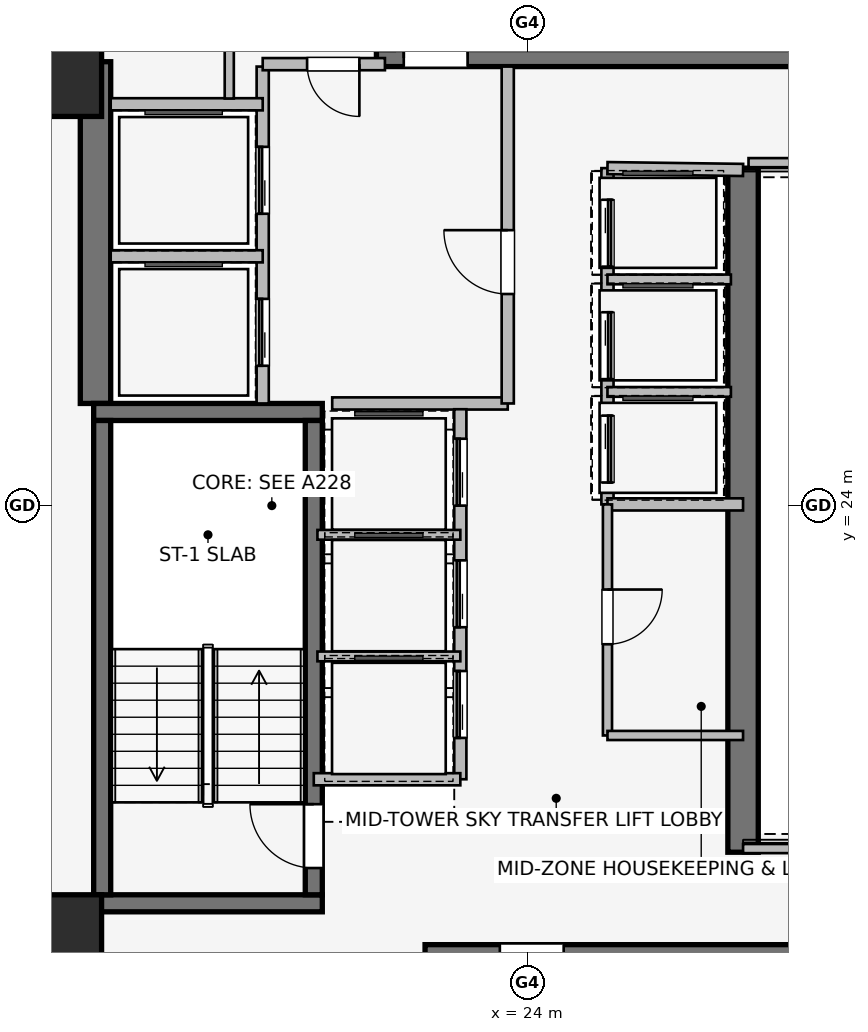
"""IFC4 building model, lengths in metres.
Left out: names, types, materials, properties, quantities, classifications, styles, units other than length and angle.
Written with IfcOpenShell. Run it as: python <this file> out.ifc"""

import sys

from ifc_helpers import new_model, si_unit, direction, frame, frame_2d, origin, origin_2d, place, context, subcontext, project, spatial, rectangle, extrude, element, fill, save


model = new_model("IFC4")
c1 = context("Model", 3, precision=1e-05, world=origin(), true_north=direction((0.0, 1.0)))
c2 = subcontext(c1, "Body", "Model", "MODEL_VIEW")
j1 = project(units=[si_unit("LENGTHUNIT", "METRE"), si_unit("PLANEANGLEUNIT", "RADIAN")], contexts=[c1])
p1 = place(None, origin())
s1 = spatial("IfcSite", under=j1, at=p1, CompositionType="ELEMENT")
p2 = place(p1, origin())
s2 = spatial("IfcBuilding", under=s1, at=p2, CompositionType="ELEMENT")
p3 = place(p2, frame((0.0, 0.0, 101.55)))
s3 = spatial("IfcBuildingStorey", under=s2, at=p3, CompositionType="ELEMENT", Elevation=101.55)
p4 = place(p3, frame((16.9, 25.68, 0.0), z_axis=(0.0, 0.0, 1.0), x_axis=(0.0, 1.0, 0.0)))
e1 = element("IfcWall", 1, at=p4, inside=s3, PredefinedType="SHEAR", context=c2, shape_type="SweptSolid", body=[
    extrude(rectangle(XDim=5.62, YDim=0.5, at=frame_2d((2.81, 0.0))), origin(), (0.0, 0.0, 1.0), 3.45),
])
p5 = place(p3, frame((27.55, 29.55, 0.0), z_axis=(0.0, 0.0, 1.0), x_axis=(0.0, -1.0, 0.0)))
e2 = element("IfcWall", 2, at=p5, inside=s3, PredefinedType="SHEAR", context=c2, shape_type="SweptSolid", body=[
    extrude(rectangle(XDim=11.25, YDim=0.5, at=frame_2d((5.625, 0.0))), origin(), (0.0, 0.0, 1.0), 3.45),
])
for number, where, z_axis, x_axis in (
    (3, (16.87, 17.46, 0.0), (0.0, 0.0, 1.0), (1.0, 0.0, 0.0)),
    (4, (20.63, 25.54, 0.0), (0.0, 0.0, 1.0), (-1.0, 0.0, 0.0)),
):
    element("IfcWall", number, at=place(p3, frame(where, z_axis=z_axis, x_axis=x_axis)), inside=s3, PredefinedType="SHEAR", context=c2, shape_type="SweptSolid", body=[
        extrude(rectangle(XDim=3.76, YDim=0.28, at=frame_2d((1.88, 0.0))), origin(), (0.0, 0.0, 1.0), 3.45),
    ])
p6 = place(p3, frame((17.01, 25.4, 0.0), z_axis=(0.0, 0.0, 1.0), x_axis=(0.0, -1.0, 0.0)))
e5 = element("IfcWall", 5, at=p6, inside=s3, PredefinedType="SHEAR", context=c2, shape_type="SweptSolid", body=[
    extrude(rectangle(XDim=7.8, YDim=0.28, at=frame_2d((3.9, 0.0))), origin(), (0.0, 0.0, 1.0), 3.45),
])
p7 = place(p3, frame((20.49, 17.6, 0.0), z_axis=(0.0, 0.0, 1.0), x_axis=(0.0, 1.0, 0.0)))
e6 = element("IfcWall", 6, at=p7, inside=s3, PredefinedType="SHEAR", context=c2, shape_type="SweptSolid", body=[
    extrude(rectangle(XDim=7.8, YDim=0.28, at=frame_2d((3.9, 0.0))), origin(), (0.0, 0.0, 1.0), 3.45),
])
p8 = place(p7, frame((0.44, 0.0, 0.0)))
e7 = element("IfcOpeningElement", 7, at=p8, cuts=e6, PredefinedType="OPENING", context=c2, shape_type="SweptSolid", body=[
    extrude(rectangle(XDim=1.05, YDim=2.0, at=frame_2d((0.525, 1.0))), frame((0.0, 0.15, 0.0), z_axis=(0.0, -1.0, 0.0), x_axis=(1.0, 0.0, 0.0)), (0.0, 0.0, 1.0), 0.3),
])
p9 = place(p3, frame((30.68, 16.64, 0.0), z_axis=(0.0, 0.0, 1.0), x_axis=(-1.0, 0.0, 0.0)))
e8 = element("IfcWall", 8, at=p9, inside=s3, PredefinedType="SHEAR", context=c2, shape_type="SweptSolid", body=[
    extrude(rectangle(XDim=8.36, YDim=0.28, at=frame_2d((4.18, 0.0))), origin(), (0.0, 0.0, 1.0), 3.45),
])
p10 = place(p9, frame((6.08, 0.0, 0.0)))
e9 = element("IfcOpeningElement", 9, at=p10, cuts=e8, PredefinedType="OPENING", context=c2, shape_type="SweptSolid", body=[
    extrude(rectangle(XDim=1.05, YDim=2.0, at=frame_2d((0.525, 1.0))), frame((0.0, 0.15, 0.0), z_axis=(0.0, -1.0, 0.0), x_axis=(1.0, 0.0, 0.0)), (0.0, 0.0, 1.0), 0.3),
])
p11 = place(p3, frame((21.52, 31.36, 0.0), z_axis=(0.0, 0.0, 1.0), x_axis=(1.0, 0.0, 0.0)))
e10 = element("IfcWall", 10, at=p11, inside=s3, PredefinedType="SHEAR", context=c2, shape_type="SweptSolid", body=[
    extrude(rectangle(XDim=8.36, YDim=0.28, at=frame_2d((4.18, 0.0))), origin(), (0.0, 0.0, 1.0), 3.45),
])
p12 = place(p11, frame((0.45, 0.0, 0.0)))
e11 = element("IfcOpeningElement", 11, at=p12, cuts=e10, PredefinedType="OPENING", context=c2, shape_type="SweptSolid", body=[
    extrude(rectangle(XDim=1.05, YDim=2.0, at=frame_2d((0.525, 1.0))), frame((0.0, 0.15, 0.0), z_axis=(0.0, -1.0, 0.0), x_axis=(1.0, 0.0, 0.0)), (0.0, 0.0, 1.0), 0.3),
])
for number, where, z_axis, x_axis in (
    (12, (16.3, 16.9, 0.0), (0.0, 0.0, 1.0), (1.0, 0.0, 0.0)),
    (13, (16.3, 31.1, 0.0), (0.0, 0.0, 1.0), (1.0, 0.0, 0.0)),
):
    element("IfcColumn", number, at=place(p3, frame(where, z_axis=z_axis, x_axis=x_axis)), inside=s3, PredefinedType="COLUMN", context=c2, shape_type="SweptSolid", body=[
        extrude(rectangle(XDim=1.4, YDim=1.4, at=origin_2d()), origin(), (0.0, 0.0, 1.0), 3.45),
    ])
p13 = place(p3, frame((19.65, 25.68, 0.0), z_axis=(0.0, 0.0, 1.0), x_axis=(0.0, 1.0, 0.0)))
e14 = element("IfcWall", 14, at=p13, inside=s3, PredefinedType="PARTITIONING", context=c2, shape_type="SweptSolid", body=[
    extrude(rectangle(XDim=5.54, YDim=0.2, at=frame_2d((2.77, 0.0))), origin(), (0.0, 0.0, 1.0), 3.19),
])
p14 = place(p13, frame((0.62, 0.0, 0.0)))
e15 = element("IfcOpeningElement", 15, at=p14, cuts=e14, PredefinedType="OPENING", context=c2, shape_type="SweptSolid", body=[
    extrude(rectangle(XDim=1.1, YDim=2.2, at=frame_2d((0.55, 1.1))), frame((0.0, 0.11, 0.0), z_axis=(0.0, -1.0, 0.0), x_axis=(1.0, 0.0, 0.0)), (0.0, 0.0, 1.0), 0.22),
])
p15 = place(p13, frame((3.12, 0.0, 0.0)))
e16 = element("IfcOpeningElement", 16, at=p15, cuts=e14, PredefinedType="OPENING", context=c2, shape_type="SweptSolid", body=[
    extrude(rectangle(XDim=1.1, YDim=2.2, at=frame_2d((0.55, 1.1))), frame((0.0, 0.11, 0.0), z_axis=(0.0, -1.0, 0.0), x_axis=(1.0, 0.0, 0.0)), (0.0, 0.0, 1.0), 0.22),
])
p16 = place(p3, frame((20.793, 25.68, 0.0), z_axis=(0.0, 0.0, 1.0), x_axis=(1.0, 0.0, 0.0)))
e17 = element("IfcWall", 17, at=p16, inside=s3, PredefinedType="PARTITIONING", context=c2, shape_type="SweptSolid", body=[
    extrude(rectangle(XDim=2.887, YDim=0.2, at=frame_2d((1.443, 0.0))), origin(), (0.0, 0.0, 1.0), 3.19),
])
p17 = place(p3, frame((23.68, 25.68, 0.0), z_axis=(0.0, 0.0, 1.0), x_axis=(0.0, 1.0, 0.0)))
e18 = element("IfcWall", 18, at=p17, inside=s3, PredefinedType="PARTITIONING", context=c2, shape_type="SweptSolid", body=[
    extrude(rectangle(XDim=5.54, YDim=0.2, at=frame_2d((2.77, 0.0))), origin(), (0.0, 0.0, 1.0), 3.19),
])
p18 = place(p17, frame((1.8, 0.0, 0.0)))
e19 = element("IfcOpeningElement", 19, at=p18, cuts=e18, PredefinedType="OPENING", context=c2, shape_type="SweptSolid", body=[
    extrude(rectangle(XDim=1.05, YDim=2.0, at=frame_2d((0.525, 1.0))), frame((0.0, 0.11, 0.0), z_axis=(0.0, -1.0, 0.0), x_axis=(1.0, 0.0, 0.0)), (0.0, 0.0, 1.0), 0.22),
])
p19 = place(p3, frame((21.66, 31.26, 0.0), z_axis=(0.0, 0.0, 1.0), x_axis=(-1.0, 0.0, 0.0)))
e20 = element("IfcWall", 20, at=p19, inside=s3, PredefinedType="PARTITIONING", context=c2, shape_type="SweptSolid", body=[
    extrude(rectangle(XDim=2.01, YDim=0.2, at=frame_2d((1.005, 0.0))), origin(), (0.0, 0.0, 1.0), 3.19),
])
p20 = place(p19, frame((0.42, 0.0, 0.0)))
e21 = element("IfcOpeningElement", 21, at=p20, cuts=e20, PredefinedType="OPENING", context=c2, shape_type="SweptSolid", body=[
    extrude(rectangle(XDim=0.86, YDim=2.0, at=frame_2d((0.43, 1.0))), frame((0.0, 0.11, 0.0), z_axis=(0.0, -1.0, 0.0), x_axis=(1.0, 0.0, 0.0)), (0.0, 0.0, 1.0), 0.22),
])
p21 = place(p3, frame((17.15, 28.1, 0.0), z_axis=(0.0, 0.0, 1.0), x_axis=(1.0, 0.0, 0.0)))
e22 = element("IfcWall", 22, at=p21, inside=s3, PredefinedType="PARTITIONING", context=c2, shape_type="SweptSolid", body=[
    extrude(rectangle(XDim=2.5, YDim=0.2, at=frame_2d((1.25, 0.0))), origin(), (0.0, 0.0, 1.0), 3.19),
])
p22 = place(p3, frame((19.65, 30.6, 0.0), z_axis=(0.0, 0.0, 1.0), x_axis=(-1.0, 0.0, 0.0)))
e23 = element("IfcWall", 23, at=p22, inside=s3, PredefinedType="PARTITIONING", context=c2, shape_type="SweptSolid", body=[
    extrude(rectangle(XDim=2.5, YDim=0.2, at=frame_2d((1.25, 0.0))), origin(), (0.0, 0.0, 1.0), 2.09),
])
p23 = place(p3, frame((22.9, 19.5, 0.0), z_axis=(0.0, 0.0, 1.0), x_axis=(0.0, 1.0, 0.0)))
e24 = element("IfcWall", 24, at=p23, inside=s3, PredefinedType="PARTITIONING", context=c2, shape_type="SweptSolid", body=[
    extrude(rectangle(XDim=6.085, YDim=0.2, at=frame_2d((3.042, 0.0))), origin(), (0.0, 0.0, 1.0), 3.19),
])
p24 = place(p23, frame((0.68, 0.0, 0.0)))
e25 = element("IfcOpeningElement", 25, at=p24, cuts=e24, PredefinedType="OPENING", context=c2, shape_type="SweptSolid", body=[
    extrude(rectangle(XDim=1.1, YDim=2.2, at=frame_2d((0.55, 1.1))), frame((0.0, 0.11, 0.0), z_axis=(0.0, -1.0, 0.0), x_axis=(1.0, 0.0, 0.0)), (0.0, 0.0, 1.0), 0.22),
])
p25 = place(p23, frame((2.5, 0.0, 0.0)))
e26 = element("IfcOpeningElement", 26, at=p25, cuts=e24, PredefinedType="OPENING", context=c2, shape_type="SweptSolid", body=[
    extrude(rectangle(XDim=1.1, YDim=2.2, at=frame_2d((0.55, 1.1))), frame((0.0, 0.11, 0.0), z_axis=(0.0, -1.0, 0.0), x_axis=(1.0, 0.0, 0.0)), (0.0, 0.0, 1.0), 0.22),
])
p26 = place(p23, frame((4.5, 0.0, 0.0)))
e27 = element("IfcOpeningElement", 27, at=p26, cuts=e24, PredefinedType="OPENING", context=c2, shape_type="SweptSolid", body=[
    extrude(rectangle(XDim=1.1, YDim=2.2, at=frame_2d((0.55, 1.1))), frame((0.0, 0.11, 0.0), z_axis=(0.0, -1.0, 0.0), x_axis=(1.0, 0.0, 0.0)), (0.0, 0.0, 1.0), 0.22),
])
p27 = place(p3, frame((20.49, 19.5, 0.0), z_axis=(0.0, 0.0, 1.0), x_axis=(1.0, 0.0, 0.0)))
e28 = element("IfcWall", 28, at=p27, inside=s3, PredefinedType="PARTITIONING", context=c2, shape_type="SweptSolid", body=[
    extrude(rectangle(XDim=2.41, YDim=0.2, at=frame_2d((1.205, 0.0))), origin(), (0.0, 0.0, 1.0), 2.09),
])
for number, where, z_axis, x_axis in (
    (29, (20.55, 21.52, 0.0), (0.0, 0.0, 1.0), (1.0, 0.0, 0.0)),
    (30, (20.55, 23.52, 0.0), (0.0, 0.0, 1.0), (1.0, 0.0, 0.0)),
):
    element("IfcWall", number, at=place(p3, frame(where, z_axis=z_axis, x_axis=x_axis)), inside=s3, PredefinedType="PARTITIONING", context=c2, shape_type="SweptSolid", body=[
        extrude(rectangle(XDim=2.35, YDim=0.16, at=frame_2d((1.175, 0.0))), origin(), (0.0, 0.0, 1.0), 3.19),
    ])
p28 = place(p3, frame((25.32, 29.55, 0.0), z_axis=(0.0, 0.0, 1.0), x_axis=(0.0, -1.0, 0.0)))
e31 = element("IfcWall", 31, at=p28, inside=s3, PredefinedType="PARTITIONING", context=c2, shape_type="SweptSolid", body=[
    extrude(rectangle(XDim=5.53, YDim=0.2, at=frame_2d((2.765, 0.0))), origin(), (0.0, 0.0, 1.0), 3.19),
])
p29 = place(p28, frame((0.52, 0.0, 0.0)))
e32 = element("IfcOpeningElement", 32, at=p29, cuts=e31, PredefinedType="OPENING", context=c2, shape_type="SweptSolid", body=[
    extrude(rectangle(XDim=1.1, YDim=2.2, at=frame_2d((0.55, 1.1))), frame((0.0, 0.11, 0.0), z_axis=(0.0, -1.0, 0.0), x_axis=(1.0, 0.0, 0.0)), (0.0, 0.0, 1.0), 0.22),
])
p30 = place(p28, frame((2.37, 0.0, 0.0)))
e33 = element("IfcOpeningElement", 33, at=p30, cuts=e31, PredefinedType="OPENING", context=c2, shape_type="SweptSolid", body=[
    extrude(rectangle(XDim=1.1, YDim=2.2, at=frame_2d((0.55, 1.1))), frame((0.0, 0.11, 0.0), z_axis=(0.0, -1.0, 0.0), x_axis=(1.0, 0.0, 0.0)), (0.0, 0.0, 1.0), 0.22),
])
p31 = place(p28, frame((4.07, 0.0, 0.0)))
e34 = element("IfcOpeningElement", 34, at=p31, cuts=e31, PredefinedType="OPENING", context=c2, shape_type="SweptSolid", body=[
    extrude(rectangle(XDim=1.1, YDim=2.2, at=frame_2d((0.55, 1.1))), frame((0.0, 0.11, 0.0), z_axis=(0.0, -1.0, 0.0), x_axis=(1.0, 0.0, 0.0)), (0.0, 0.0, 1.0), 0.22),
])
p32 = place(p3, frame((27.55, 29.52, 0.0), z_axis=(0.0, 0.0, 1.0), x_axis=(-0.999909343457, 0.013464949556, 0.0)))
e35 = element("IfcWall", 35, at=p32, inside=s3, PredefinedType="PARTITIONING", context=c2, shape_type="SweptSolid", body=[
    extrude(rectangle(XDim=2.23, YDim=0.2, at=frame_2d((1.115, 0.0))), origin(), (0.0, 0.0, 1.0), 2.09),
])
p33 = place(p3, frame((25.32, 24.02, 0.0), z_axis=(0.0, 0.0, 1.0), x_axis=(1.0, 0.0, 0.0)))
e36 = element("IfcWall", 36, at=p33, inside=s3, PredefinedType="PARTITIONING", context=c2, shape_type="SweptSolid", body=[
    extrude(rectangle(XDim=2.23, YDim=0.2, at=frame_2d((1.115, 0.0))), origin(), (0.0, 0.0, 1.0), 3.19),
])
for number, where, z_axis, x_axis in (
    (37, (25.32, 25.87, 0.0), (0.0, 0.0, 1.0), (1.0, 0.0, 0.0)),
    (38, (25.32, 27.72, 0.0), (0.0, 0.0, 1.0), (1.0, 0.0, 0.0)),
):
    element("IfcWall", number, at=place(p3, frame(where, z_axis=z_axis, x_axis=x_axis)), inside=s3, PredefinedType="PARTITIONING", context=c2, shape_type="SweptSolid", body=[
        extrude(rectangle(XDim=2.03, YDim=0.16, at=frame_2d((1.015, 0.0))), origin(), (0.0, 0.0, 1.0), 3.19),
    ])
p34 = place(p3, frame((25.32, 24.02, 0.0), z_axis=(0.0, 0.0, 1.0), x_axis=(0.0, -1.0, 0.0)))
e39 = element("IfcWall", 39, at=p34, inside=s3, PredefinedType="PARTITIONING", context=c2, shape_type="SweptSolid", body=[
    extrude(rectangle(XDim=3.8, YDim=0.15, at=frame_2d((1.9, 0.0))), origin(), (0.0, 0.0, 1.0), 3.19),
])
p35 = place(p34, frame((1.4, 0.0, 0.0)))
e40 = element("IfcOpeningElement", 40, at=p35, cuts=e39, PredefinedType="OPENING", context=c2, shape_type="SweptSolid", body=[
    extrude(rectangle(XDim=0.9, YDim=2.0, at=frame_2d((0.45, 1.0))), frame((0.0, 0.085, 0.0), z_axis=(0.0, -1.0, 0.0), x_axis=(1.0, 0.0, 0.0)), (0.0, 0.0, 1.0), 0.17),
])
p36 = place(p3, frame((25.32, 20.22, 0.0), z_axis=(0.0, 0.0, 1.0), x_axis=(1.0, 0.0, 0.0)))
e41 = element("IfcWall", 41, at=p36, inside=s3, PredefinedType="PARTITIONING", context=c2, shape_type="SweptSolid", body=[
    extrude(rectangle(XDim=2.23, YDim=0.15, at=frame_2d((1.115, 0.0))), origin(), (0.0, 0.0, 1.0), 3.19),
])
p37 = place(p3, frame((19.1, 33.35, 0.0), z_axis=(0.0, 0.0, 1.0), x_axis=(0.0, -1.0, 0.0)))
e42 = element("IfcWall", 42, at=p37, inside=s3, PredefinedType="PARTITIONING", context=c2, shape_type="SweptSolid", body=[
    extrude(rectangle(XDim=2.655, YDim=0.15, at=frame_2d((1.328, 0.0))), origin(), (0.0, 0.0, 1.0), 2.42),
])
p38 = place(p3, frame((27.55, 18.36, 0.0), z_axis=(0.0, 0.0, 1.0), x_axis=(1.0, 0.0, 0.0)))
e43 = element("IfcWall", 43, at=p38, inside=s3, PredefinedType="PARTITIONING", context=c2, shape_type="SweptSolid", body=[
    extrude(rectangle(XDim=12.29, YDim=0.15, at=frame_2d((6.145, 0.0))), origin(), (0.0, 0.0, 1.0), 2.331),
])
p39 = place(p3, frame((39.84, 29.64, 0.0), z_axis=(0.0, 0.0, 1.0), x_axis=(-1.0, 0.0, 0.0)))
e44 = element("IfcWall", 44, at=p39, inside=s3, PredefinedType="PARTITIONING", context=c2, shape_type="SweptSolid", body=[
    extrude(rectangle(XDim=12.2, YDim=0.15, at=frame_2d((6.1, 0.0))), origin(), (0.0, 0.0, 1.0), 2.331),
])
p40 = place(p8, origin())
e45 = element("IfcDoor", 45, at=p40, inside=s3, OperationType="SINGLE_SWING_RIGHT", PredefinedType="DOOR", context=c2, shape_type="SweptSolid", body=[
    extrude(rectangle(XDim=1.05, YDim=2.0, at=frame_2d((0.525, 1.0))), frame((0.0, 0.025, 0.0), z_axis=(0.0, -1.0, 0.0), x_axis=(1.0, 0.0, 0.0)), (0.0, 0.0, 1.0), 0.05),
])
fill(e7, e45)
p41 = place(p10, origin())
e46 = element("IfcDoor", 46, at=p41, inside=s3, OperationType="SINGLE_SWING_RIGHT", PredefinedType="DOOR", context=c2, shape_type="SweptSolid", body=[
    extrude(rectangle(XDim=1.05, YDim=2.0, at=frame_2d((0.525, 1.0))), frame((0.0, 0.025, 0.0), z_axis=(0.0, -1.0, 0.0), x_axis=(1.0, 0.0, 0.0)), (0.0, 0.0, 1.0), 0.05),
])
fill(e9, e46)
p42 = place(p12, origin())
e47 = element("IfcDoor", 47, at=p42, inside=s3, OperationType="SINGLE_SWING_LEFT", PredefinedType="DOOR", context=c2, shape_type="SweptSolid", body=[
    extrude(rectangle(XDim=1.05, YDim=2.0, at=frame_2d((0.525, 1.0))), frame((0.0, 0.025, 0.0), z_axis=(0.0, -1.0, 0.0), x_axis=(1.0, 0.0, 0.0)), (0.0, 0.0, 1.0), 0.05),
])
fill(e11, e47)
p43 = place(p14, origin())
e48 = element("IfcDoor", 48, at=p43, inside=s3, OperationType="SLIDING_TO_LEFT", PredefinedType="DOOR", context=c2, shape_type="SweptSolid", body=[
    extrude(rectangle(XDim=1.1, YDim=2.2, at=frame_2d((0.55, 1.1))), frame((0.0, 0.025, 0.0), z_axis=(0.0, -1.0, 0.0), x_axis=(1.0, 0.0, 0.0)), (0.0, 0.0, 1.0), 0.05),
])
fill(e15, e48)
p44 = place(p15, origin())
e49 = element("IfcDoor", 49, at=p44, inside=s3, OperationType="SLIDING_TO_LEFT", PredefinedType="DOOR", context=c2, shape_type="SweptSolid", body=[
    extrude(rectangle(XDim=1.1, YDim=2.2, at=frame_2d((0.55, 1.1))), frame((0.0, 0.025, 0.0), z_axis=(0.0, -1.0, 0.0), x_axis=(1.0, 0.0, 0.0)), (0.0, 0.0, 1.0), 0.05),
])
fill(e16, e49)
p45 = place(p18, origin())
e50 = element("IfcDoor", 50, at=p45, inside=s3, OperationType="SINGLE_SWING_RIGHT", PredefinedType="DOOR", context=c2, shape_type="SweptSolid", body=[
    extrude(rectangle(XDim=1.05, YDim=2.0, at=frame_2d((0.525, 1.0))), frame((0.0, 0.025, 0.0), z_axis=(0.0, -1.0, 0.0), x_axis=(1.0, 0.0, 0.0)), (0.0, 0.0, 1.0), 0.05),
])
fill(e19, e50)
p46 = place(p20, origin())
e51 = element("IfcDoor", 51, at=p46, inside=s3, OperationType="SINGLE_SWING_LEFT", PredefinedType="DOOR", context=c2, shape_type="SweptSolid", body=[
    extrude(rectangle(XDim=0.86, YDim=2.0, at=frame_2d((0.43, 1.0))), frame((0.0, 0.025, 0.0), z_axis=(0.0, -1.0, 0.0), x_axis=(1.0, 0.0, 0.0)), (0.0, 0.0, 1.0), 0.05),
])
fill(e21, e51)
p47 = place(p24, origin())
e52 = element("IfcDoor", 52, at=p47, inside=s3, OperationType="SLIDING_TO_LEFT", PredefinedType="DOOR", context=c2, shape_type="SweptSolid", body=[
    extrude(rectangle(XDim=1.1, YDim=2.2, at=frame_2d((0.55, 1.1))), frame((0.0, 0.025, 0.0), z_axis=(0.0, -1.0, 0.0), x_axis=(1.0, 0.0, 0.0)), (0.0, 0.0, 1.0), 0.05),
])
fill(e25, e52)
p48 = place(p25, origin())
e53 = element("IfcDoor", 53, at=p48, inside=s3, OperationType="SLIDING_TO_LEFT", PredefinedType="DOOR", context=c2, shape_type="SweptSolid", body=[
    extrude(rectangle(XDim=1.1, YDim=2.2, at=frame_2d((0.55, 1.1))), frame((0.0, 0.025, 0.0), z_axis=(0.0, -1.0, 0.0), x_axis=(1.0, 0.0, 0.0)), (0.0, 0.0, 1.0), 0.05),
])
fill(e26, e53)
p49 = place(p26, origin())
e54 = element("IfcDoor", 54, at=p49, inside=s3, OperationType="SLIDING_TO_LEFT", PredefinedType="DOOR", context=c2, shape_type="SweptSolid", body=[
    extrude(rectangle(XDim=1.1, YDim=2.2, at=frame_2d((0.55, 1.1))), frame((0.0, 0.025, 0.0), z_axis=(0.0, -1.0, 0.0), x_axis=(1.0, 0.0, 0.0)), (0.0, 0.0, 1.0), 0.05),
])
fill(e27, e54)
p50 = place(p29, origin())
e55 = element("IfcDoor", 55, at=p50, inside=s3, OperationType="SLIDING_TO_LEFT", PredefinedType="DOOR", context=c2, shape_type="SweptSolid", body=[
    extrude(rectangle(XDim=1.1, YDim=2.2, at=frame_2d((0.55, 1.1))), frame((0.0, 0.025, 0.0), z_axis=(0.0, -1.0, 0.0), x_axis=(1.0, 0.0, 0.0)), (0.0, 0.0, 1.0), 0.05),
])
fill(e32, e55)
p51 = place(p30, origin())
e56 = element("IfcDoor", 56, at=p51, inside=s3, OperationType="SLIDING_TO_LEFT", PredefinedType="DOOR", context=c2, shape_type="SweptSolid", body=[
    extrude(rectangle(XDim=1.1, YDim=2.2, at=frame_2d((0.55, 1.1))), frame((0.0, 0.025, 0.0), z_axis=(0.0, -1.0, 0.0), x_axis=(1.0, 0.0, 0.0)), (0.0, 0.0, 1.0), 0.05),
])
fill(e33, e56)
p52 = place(p31, origin())
e57 = element("IfcDoor", 57, at=p52, inside=s3, OperationType="SLIDING_TO_LEFT", PredefinedType="DOOR", context=c2, shape_type="SweptSolid", body=[
    extrude(rectangle(XDim=1.1, YDim=2.2, at=frame_2d((0.55, 1.1))), frame((0.0, 0.025, 0.0), z_axis=(0.0, -1.0, 0.0), x_axis=(1.0, 0.0, 0.0)), (0.0, 0.0, 1.0), 0.05),
])
fill(e34, e57)
p53 = place(p35, origin())
e58 = element("IfcDoor", 58, at=p53, inside=s3, OperationType="SINGLE_SWING_LEFT", PredefinedType="DOOR", context=c2, shape_type="SweptSolid", body=[
    extrude(rectangle(XDim=0.9, YDim=2.0, at=frame_2d((0.45, 1.0))), frame((0.0, 0.025, 0.0), z_axis=(0.0, -1.0, 0.0), x_axis=(1.0, 0.0, 0.0)), (0.0, 0.0, 1.0), 0.05),
])
fill(e40, e58)
save(model, sys.argv[1])
